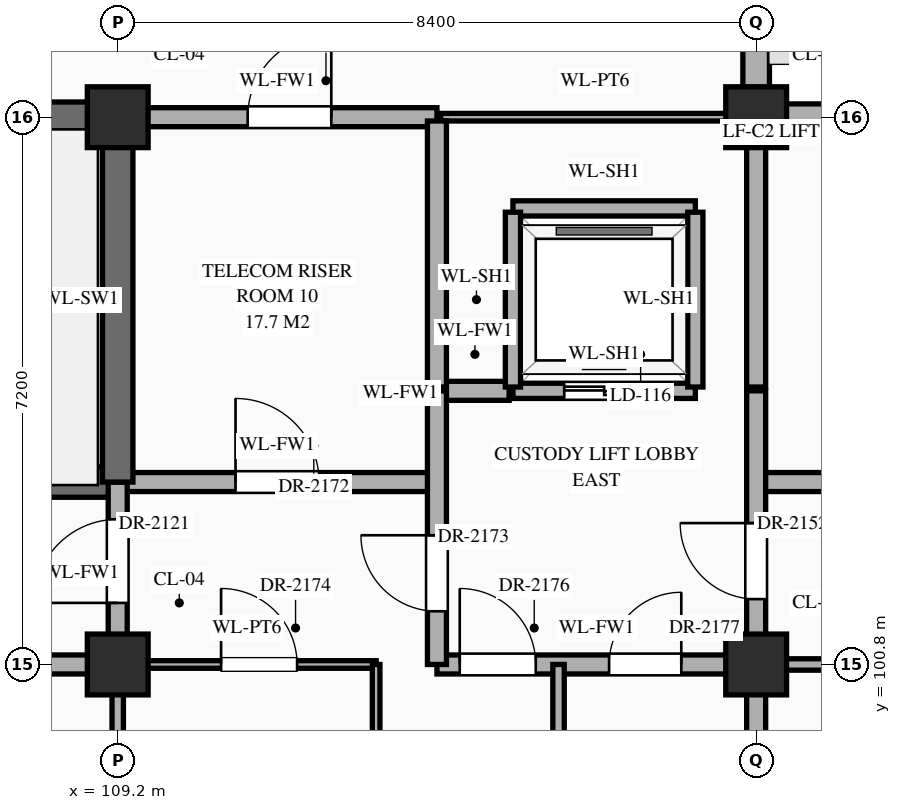
"""IFC4 building model, lengths in metres.
Left out: names, types, materials, properties, quantities, classifications, styles, units other than length and angle.
Written with IfcOpenShell. Run it as: python <this file> out.ifc"""

import sys

from ifc_helpers import new_model, si_unit, direction, frame, frame_2d, origin, origin_2d, place, context, subcontext, project, spatial, rectangle, extrude, element, fill, save


model = new_model("IFC4")
c1 = context("Model", 3, precision=1e-05, world=origin(), true_north=direction((0.0, 1.0)))
c2 = subcontext(c1, "Body", "Model", "MODEL_VIEW")
j1 = project(units=[si_unit("LENGTHUNIT", "METRE"), si_unit("PLANEANGLEUNIT", "RADIAN")], contexts=[c1])
p1 = place(None, origin())
s1 = spatial("IfcSite", under=j1, at=p1, CompositionType="ELEMENT")
p2 = place(p1, origin())
s2 = spatial("IfcBuilding", under=s1, at=p2, CompositionType="ELEMENT")
p3 = place(p2, frame((0.0, 0.0, 26.1)))
s3 = spatial("IfcBuildingStorey", under=s2, at=p3, CompositionType="ELEMENT", Elevation=26.1)
for number, where, z_axis, x_axis in (
    (1, (109.2, 100.8, 0.0), (0.0, 0.0, 1.0), (1.0, 0.0, 0.0)),
    (2, (109.2, 108.0, 0.0), (0.0, 0.0, 1.0), (1.0, 0.0, 0.0)),
    (3, (117.6, 100.8, 0.0), (0.0, 0.0, 1.0), (1.0, 0.0, 0.0)),
    (4, (117.6, 108.0, 0.0), (0.0, 0.0, 1.0), (1.0, 0.0, 0.0)),
):
    element("IfcColumn", number, at=place(p3, frame(where, z_axis=z_axis, x_axis=x_axis)), inside=s3, PredefinedType="COLUMN", context=c2, shape_type="SweptSolid", body=[
        extrude(rectangle(XDim=0.8, YDim=0.8, at=origin_2d()), origin(), (0.0, 0.0, 1.0), 4.5),
    ])
p4 = place(p3, frame((117.6, 108.395, 0.0), z_axis=(0.0, 0.0, 1.0), x_axis=(0.0, 1.0, 0.0)))
e5 = element("IfcWall", 5, at=p4, inside=s3, PredefinedType="STANDARD", context=c2, shape_type="SweptSolid", body=[
    extrude(rectangle(XDim=6.41, YDim=0.35, at=frame_2d((3.205, 0.0))), origin(), (0.0, 0.0, 1.0), 3.59),
])
p5 = place(p4, frame((3.73, 0.0, 0.85)))
e6 = element("IfcOpeningElement", 6, at=p5, cuts=e5, PredefinedType="OPENING", context=c2, shape_type="SweptSolid", body=[
    extrude(rectangle(XDim=1.55, YDim=2.12, at=frame_2d((0.775, 1.06))), frame((0.0, 0.187, 0.0), z_axis=(0.0, -1.0, 0.0), x_axis=(1.0, 0.0, 0.0)), (0.0, 0.0, 1.0), 0.374),
])
p6 = place(p3, frame((117.995, 108.0, 0.0), z_axis=(0.0, 0.0, 1.0), x_axis=(1.0, 0.0, 0.0)))
e7 = element("IfcWall", 7, at=p6, inside=s3, PredefinedType="STANDARD", context=c2, shape_type="SweptSolid", body=[
    extrude(rectangle(XDim=7.61, YDim=0.35, at=frame_2d((3.805, 0.0))), origin(), (0.0, 0.0, 1.0), 3.59),
])
p7 = place(p3, frame((96.6, 100.8, 0.0), z_axis=(0.0, 0.0, 1.0), x_axis=(1.0, 0.0, 0.0)))
e8 = element("IfcWall", 8, at=p7, inside=s3, PredefinedType="STANDARD", context=c2, shape_type="SweptSolid", body=[
    extrude(rectangle(XDim=12.6, YDim=0.25, at=frame_2d((6.3, 0.0))), origin(), (0.0, 0.0, 1.0), 3.39),
])
p8 = place(p7, frame((7.9, 0.0, 0.0)))
e9 = element("IfcOpeningElement", 9, at=p8, cuts=e8, PredefinedType="OPENING", context=c2, shape_type="SweptSolid", body=[
    extrude(rectangle(XDim=1.0, YDim=2.2, at=frame_2d((0.5, 1.1))), frame((0.0, 0.137, 0.0), z_axis=(0.0, -1.0, 0.0), x_axis=(1.0, 0.0, 0.0)), (0.0, 0.0, 1.0), 0.274),
])
p9 = place(p3, frame((109.2, 100.8, 0.0), z_axis=(0.0, 0.0, 1.0), x_axis=(1.0, 0.0, 0.0)))
e10 = element("IfcWall", 10, at=p9, inside=s3, PredefinedType="STANDARD", context=c2, shape_type="SweptSolid", body=[
    extrude(rectangle(XDim=3.4, YDim=0.1, at=frame_2d((1.7, 0.0))), origin(), (0.0, 0.0, 1.0), 3.39),
])
p10 = place(p9, frame((1.36, 0.0, 0.0)))
e11 = element("IfcOpeningElement", 11, at=p10, cuts=e10, PredefinedType="OPENING", context=c2, shape_type="SweptSolid", body=[
    extrude(rectangle(XDim=1.0, YDim=2.25, at=frame_2d((0.5, 1.125))), frame((0.0, 0.062, 0.0), z_axis=(0.0, -1.0, 0.0), x_axis=(1.0, 0.0, 0.0)), (0.0, 0.0, 1.0), 0.124),
])
p11 = place(p3, frame((113.4, 100.8, 0.0), z_axis=(0.0, 0.0, 1.0), x_axis=(1.0, 0.0, 0.0)))
e12 = element("IfcWall", 12, at=p11, inside=s3, PredefinedType="STANDARD", context=c2, shape_type="SweptSolid", body=[
    extrude(rectangle(XDim=4.2, YDim=0.25, at=frame_2d((2.1, 0.0))), origin(), (0.0, 0.0, 1.0), 3.39),
])
p12 = place(p11, frame((0.3, 0.0, 0.0)))
e13 = element("IfcOpeningElement", 13, at=p12, cuts=e12, PredefinedType="OPENING", context=c2, shape_type="SweptSolid", body=[
    extrude(rectangle(XDim=1.0, YDim=2.2, at=frame_2d((0.5, 1.1))), frame((0.0, 0.137, 0.0), z_axis=(0.0, -1.0, 0.0), x_axis=(1.0, 0.0, 0.0)), (0.0, 0.0, 1.0), 0.274),
])
p13 = place(p11, frame((2.265, 0.0, 0.0)))
e14 = element("IfcOpeningElement", 14, at=p13, cuts=e12, PredefinedType="OPENING", context=c2, shape_type="SweptSolid", body=[
    extrude(rectangle(XDim=0.95, YDim=2.15, at=frame_2d((0.475, 1.075))), frame((0.0, 0.137, 0.0), z_axis=(0.0, -1.0, 0.0), x_axis=(1.0, 0.0, 0.0)), (0.0, 0.0, 1.0), 0.274),
])
p14 = place(p3, frame((117.6, 100.8, 0.0), z_axis=(0.0, 0.0, 1.0), x_axis=(1.0, 0.0, 0.0)))
e15 = element("IfcWall", 15, at=p14, inside=s3, PredefinedType="STANDARD", context=c2, shape_type="SweptSolid", body=[
    extrude(rectangle(XDim=4.2, YDim=0.15, at=frame_2d((2.1, 0.0))), origin(), (0.0, 0.0, 1.0), 3.39),
])
p15 = place(p14, frame((1.81, 0.0, 0.0)))
e16 = element("IfcOpeningElement", 16, at=p15, cuts=e15, PredefinedType="OPENING", context=c2, shape_type="SweptSolid", body=[
    extrude(rectangle(XDim=0.9, YDim=2.15, at=frame_2d((0.45, 1.075))), frame((0.0, 0.087, 0.0), z_axis=(0.0, -1.0, 0.0), x_axis=(1.0, 0.0, 0.0)), (0.0, 0.0, 1.0), 0.174),
])
p16 = place(p3, frame((100.8, 103.2, 0.0), z_axis=(0.0, 0.0, 1.0), x_axis=(1.0, 0.0, 0.0)))
e17 = element("IfcWall", 17, at=p16, inside=s3, PredefinedType="SHEAR", context=c2, shape_type="SweptSolid", body=[
    extrude(rectangle(XDim=8.4, YDim=0.4, at=frame_2d((4.2, 0.0))), origin(), (0.0, 0.0, 1.0), 4.24),
])
p17 = place(p16, frame((0.65, 0.0, 0.0)))
e18 = element("IfcOpeningElement", 18, at=p17, cuts=e17, PredefinedType="OPENING", context=c2, shape_type="SweptSolid", body=[
    extrude(rectangle(XDim=1.1, YDim=2.2, at=frame_2d((0.55, 1.1))), frame((0.0, 0.212, 0.0), z_axis=(0.0, -1.0, 0.0), x_axis=(1.0, 0.0, 0.0)), (0.0, 0.0, 1.0), 0.424),
])
p18 = place(p3, frame((109.2, 103.2, 0.0), z_axis=(0.0, 0.0, 1.0), x_axis=(1.0, 0.0, 0.0)))
e19 = element("IfcWall", 19, at=p18, inside=s3, PredefinedType="STANDARD", context=c2, shape_type="SweptSolid", body=[
    extrude(rectangle(XDim=4.2, YDim=0.25, at=frame_2d((2.1, 0.0))), origin(), (0.0, 0.0, 1.0), 4.24),
])
p19 = place(p18, frame((1.55, 0.0, 0.0)))
e20 = element("IfcOpeningElement", 20, at=p19, cuts=e19, PredefinedType="OPENING", context=c2, shape_type="SweptSolid", body=[
    extrude(rectangle(XDim=1.1, YDim=2.2, at=frame_2d((0.55, 1.1))), frame((0.0, 0.137, 0.0), z_axis=(0.0, -1.0, 0.0), x_axis=(1.0, 0.0, 0.0)), (0.0, 0.0, 1.0), 0.274),
])
p20 = place(p3, frame((117.6, 103.2, 0.0), z_axis=(0.0, 0.0, 1.0), x_axis=(1.0, 0.0, 0.0)))
e21 = element("IfcWall", 21, at=p20, inside=s3, PredefinedType="STANDARD", context=c2, shape_type="SweptSolid", body=[
    extrude(rectangle(XDim=4.2, YDim=0.25, at=frame_2d((2.1, 0.0))), origin(), (0.0, 0.0, 1.0), 4.24),
])
p21 = place(p20, frame((1.625, 0.0, 0.0)))
e22 = element("IfcOpeningElement", 22, at=p21, cuts=e21, PredefinedType="OPENING", context=c2, shape_type="SweptSolid", body=[
    extrude(rectangle(XDim=0.95, YDim=2.15, at=frame_2d((0.475, 1.075))), frame((0.0, 0.137, 0.0), z_axis=(0.0, -1.0, 0.0), x_axis=(1.0, 0.0, 0.0)), (0.0, 0.0, 1.0), 0.274),
])
p22 = place(p3, frame((113.45, 104.4, 0.0), z_axis=(0.0, 0.0, 1.0), x_axis=(1.0, 0.0, 0.0)))
e23 = element("IfcWall", 23, at=p22, inside=s3, PredefinedType="STANDARD", context=c2, shape_type="SweptSolid", body=[
    extrude(rectangle(XDim=0.9, YDim=0.25, at=frame_2d((0.45, 0.0))), origin(), (0.0, 0.0, 1.0), 4.24),
])
p23 = place(p3, frame((114.4, 104.4, 0.0), z_axis=(0.0, 0.0, 1.0), x_axis=(1.0, 0.0, 0.0)))
e24 = element("IfcWall", 24, at=p23, inside=s3, PredefinedType="STANDARD", context=c2, shape_type="SweptSolid", body=[
    extrude(rectangle(XDim=2.4, YDim=0.2, at=frame_2d((1.2, 0.0))), origin(), (0.0, 0.0, 1.0), 4.24),
])
p24 = place(p23, frame((0.675, 0.0, 0.0)))
e25 = element("IfcOpeningElement", 25, at=p24, cuts=e24, PredefinedType="OPENING", context=c2, shape_type="SweptSolid", body=[
    extrude(rectangle(XDim=1.05, YDim=2.15, at=frame_2d((0.525, 1.075))), frame((0.0, 0.112, 0.0), z_axis=(0.0, -1.0, 0.0), x_axis=(1.0, 0.0, 0.0)), (0.0, 0.0, 1.0), 0.224),
])
p25 = place(p3, frame((114.4, 106.8, 0.0), z_axis=(0.0, 0.0, 1.0), x_axis=(1.0, 0.0, 0.0)))
e26 = element("IfcWall", 26, at=p25, inside=s3, PredefinedType="STANDARD", context=c2, shape_type="SweptSolid", body=[
    extrude(rectangle(XDim=2.4, YDim=0.2, at=frame_2d((1.2, 0.0))), origin(), (0.0, 0.0, 1.0), 4.24),
])
p26 = place(p3, frame((100.8, 108.0, 0.0), z_axis=(0.0, 0.0, 1.0), x_axis=(1.0, 0.0, 0.0)))
e27 = element("IfcWall", 27, at=p26, inside=s3, PredefinedType="SHEAR", context=c2, shape_type="SweptSolid", body=[
    extrude(rectangle(XDim=8.4, YDim=0.4, at=frame_2d((4.2, 0.0))), origin(), (0.0, 0.0, 1.0), 4.24),
])
p27 = place(p3, frame((109.2, 108.0, 0.0), z_axis=(0.0, 0.0, 1.0), x_axis=(1.0, 0.0, 0.0)))
e28 = element("IfcWall", 28, at=p27, inside=s3, PredefinedType="STANDARD", context=c2, shape_type="SweptSolid", body=[
    extrude(rectangle(XDim=4.2, YDim=0.25, at=frame_2d((2.1, 0.0))), origin(), (0.0, 0.0, 1.0), 3.39),
])
p28 = place(p27, frame((1.71, 0.0, 0.0)))
e29 = element("IfcOpeningElement", 29, at=p28, cuts=e28, PredefinedType="OPENING", context=c2, shape_type="SweptSolid", body=[
    extrude(rectangle(XDim=1.1, YDim=2.2, at=frame_2d((0.55, 1.1))), frame((0.0, 0.137, 0.0), z_axis=(0.0, -1.0, 0.0), x_axis=(1.0, 0.0, 0.0)), (0.0, 0.0, 1.0), 0.274),
])
p29 = place(p3, frame((113.45, 108.0, 0.0), z_axis=(0.0, 0.0, 1.0), x_axis=(1.0, 0.0, 0.0)))
e30 = element("IfcWall", 30, at=p29, inside=s3, PredefinedType="STANDARD", context=c2, shape_type="SweptSolid", body=[
    extrude(rectangle(XDim=4.06, YDim=0.1, at=frame_2d((2.03, 0.0))), origin(), (0.0, 0.0, 1.0), 3.39),
])
p30 = place(p3, frame((109.2, 96.0, 0.0), z_axis=(0.0, 0.0, 1.0), x_axis=(0.0, 1.0, 0.0)))
e31 = element("IfcWall", 31, at=p30, inside=s3, PredefinedType="STANDARD", context=c2, shape_type="SweptSolid", body=[
    extrude(rectangle(XDim=4.8, YDim=0.15, at=frame_2d((2.4, 0.0))), origin(), (0.0, 0.0, 1.0), 3.49),
])
p31 = place(p3, frame((109.2, 100.8, 0.0), z_axis=(0.0, 0.0, 1.0), x_axis=(0.0, 1.0, 0.0)))
e32 = element("IfcWall", 32, at=p31, inside=s3, PredefinedType="STANDARD", context=c2, shape_type="SweptSolid", body=[
    extrude(rectangle(XDim=2.4, YDim=0.25, at=frame_2d((1.2, 0.0))), origin(), (0.0, 0.0, 1.0), 3.49),
])
p32 = place(p31, frame((0.81, 0.0, 0.0)))
e33 = element("IfcOpeningElement", 33, at=p32, cuts=e32, PredefinedType="OPENING", context=c2, shape_type="SweptSolid", body=[
    extrude(rectangle(XDim=1.1, YDim=2.2, at=frame_2d((0.55, 1.1))), frame((0.0, 0.137, 0.0), z_axis=(0.0, -1.0, 0.0), x_axis=(1.0, 0.0, 0.0)), (0.0, 0.0, 1.0), 0.274),
])
p33 = place(p3, frame((109.2, 103.2, 0.0), z_axis=(0.0, 0.0, 1.0), x_axis=(0.0, 1.0, 0.0)))
e34 = element("IfcWall", 34, at=p33, inside=s3, PredefinedType="SHEAR", context=c2, shape_type="SweptSolid", body=[
    extrude(rectangle(XDim=4.8, YDim=0.4, at=frame_2d((2.4, 0.0))), origin(), (0.0, 0.0, 1.0), 4.24),
])
p34 = place(p3, frame((112.6, 96.0, 0.0), z_axis=(0.0, 0.0, 1.0), x_axis=(0.0, 1.0, 0.0)))
e35 = element("IfcWall", 35, at=p34, inside=s3, PredefinedType="STANDARD", context=c2, shape_type="SweptSolid", body=[
    extrude(rectangle(XDim=4.8, YDim=0.1, at=frame_2d((2.4, 0.0))), origin(), (0.0, 0.0, 1.0), 4.24),
])
p35 = place(p34, frame((1.84, 0.0, 0.0)))
e36 = element("IfcOpeningElement", 36, at=p35, cuts=e35, PredefinedType="OPENING", context=c2, shape_type="SweptSolid", body=[
    extrude(rectangle(XDim=1.12, YDim=2.25, at=frame_2d((0.56, 1.125))), frame((0.0, 0.062, 0.0), z_axis=(0.0, -1.0, 0.0), x_axis=(1.0, 0.0, 0.0)), (0.0, 0.0, 1.0), 0.124),
])
p36 = place(p3, frame((113.4, 100.8, 0.0), z_axis=(0.0, 0.0, 1.0), x_axis=(0.0, 1.0, 0.0)))
e37 = element("IfcWall", 37, at=p36, inside=s3, PredefinedType="STANDARD", context=c2, shape_type="SweptSolid", body=[
    extrude(rectangle(XDim=3.6, YDim=0.25, at=frame_2d((1.8, 0.0))), origin(), (0.0, 0.0, 1.0), 3.84),
])
p37 = place(p36, frame((0.7, 0.0, 0.0)))
e38 = element("IfcOpeningElement", 38, at=p37, cuts=e37, PredefinedType="OPENING", context=c2, shape_type="SweptSolid", body=[
    extrude(rectangle(XDim=1.0, YDim=2.2, at=frame_2d((0.5, 1.1))), frame((0.0, 0.137, 0.0), z_axis=(0.0, -1.0, 0.0), x_axis=(1.0, 0.0, 0.0)), (0.0, 0.0, 1.0), 0.274),
])
p38 = place(p3, frame((113.4, 104.45, 0.0), z_axis=(0.0, 0.0, 1.0), x_axis=(0.0, 1.0, 0.0)))
e39 = element("IfcWall", 39, at=p38, inside=s3, PredefinedType="STANDARD", context=c2, shape_type="SweptSolid", body=[
    extrude(rectangle(XDim=3.5, YDim=0.25, at=frame_2d((1.75, 0.0))), origin(), (0.0, 0.0, 1.0), 3.84),
])
p39 = place(p3, frame((114.4, 104.45, 0.0), z_axis=(0.0, 0.0, 1.0), x_axis=(0.0, 1.0, 0.0)))
e40 = element("IfcWall", 40, at=p39, inside=s3, PredefinedType="STANDARD", context=c2, shape_type="SweptSolid", body=[
    extrude(rectangle(XDim=2.3, YDim=0.2, at=frame_2d((1.15, 0.0))), origin(), (0.0, 0.0, 1.0), 4.24),
])
p40 = place(p3, frame((115.0, 96.0, 0.0), z_axis=(0.0, 0.0, 1.0), x_axis=(0.0, 1.0, 0.0)))
e41 = element("IfcWall", 41, at=p40, inside=s3, PredefinedType="STANDARD", context=c2, shape_type="SweptSolid", body=[
    extrude(rectangle(XDim=4.8, YDim=0.15, at=frame_2d((2.4, 0.0))), origin(), (0.0, 0.0, 1.0), 4.24),
])
p41 = place(p40, frame((1.82, 0.0, 0.0)))
e42 = element("IfcOpeningElement", 42, at=p41, cuts=e41, PredefinedType="OPENING", context=c2, shape_type="SweptSolid", body=[
    extrude(rectangle(XDim=1.16, YDim=2.3, at=frame_2d((0.58, 1.15))), frame((0.0, 0.087, 0.0), z_axis=(0.0, -1.0, 0.0), x_axis=(1.0, 0.0, 0.0)), (0.0, 0.0, 1.0), 0.174),
])
p42 = place(p3, frame((116.8, 104.45, 0.0), z_axis=(0.0, 0.0, 1.0), x_axis=(0.0, 1.0, 0.0)))
e43 = element("IfcWall", 43, at=p42, inside=s3, PredefinedType="STANDARD", context=c2, shape_type="SweptSolid", body=[
    extrude(rectangle(XDim=2.3, YDim=0.2, at=frame_2d((1.15, 0.0))), origin(), (0.0, 0.0, 1.0), 4.24),
])
p43 = place(p3, frame((117.6, 91.2, 0.0), z_axis=(0.0, 0.0, 1.0), x_axis=(0.0, 1.0, 0.0)))
e44 = element("IfcWall", 44, at=p43, inside=s3, PredefinedType="STANDARD", context=c2, shape_type="SweptSolid", body=[
    extrude(rectangle(XDim=13.2, YDim=0.25, at=frame_2d((6.6, 0.0))), origin(), (0.0, 0.0, 1.0), 3.49),
])
p44 = place(p43, frame((0.49, 0.0, 0.0)))
e45 = element("IfcOpeningElement", 45, at=p44, cuts=e44, PredefinedType="OPENING", context=c2, shape_type="SweptSolid", body=[
    extrude(rectangle(XDim=1.1, YDim=2.2, at=frame_2d((0.55, 1.1))), frame((0.0, 0.137, 0.0), z_axis=(0.0, -1.0, 0.0), x_axis=(1.0, 0.0, 0.0)), (0.0, 0.0, 1.0), 0.274),
])
p45 = place(p43, frame((10.46, 0.0, 0.0)))
e46 = element("IfcOpeningElement", 46, at=p45, cuts=e44, PredefinedType="OPENING", context=c2, shape_type="SweptSolid", body=[
    extrude(rectangle(XDim=1.0, YDim=2.2, at=frame_2d((0.5, 1.1))), frame((0.0, 0.137, 0.0), z_axis=(0.0, -1.0, 0.0), x_axis=(1.0, 0.0, 0.0)), (0.0, 0.0, 1.0), 0.274),
])
p46 = place(p43, frame((3.26, 0.0, 0.0)))
e47 = element("IfcOpeningElement", 47, at=p46, cuts=e44, PredefinedType="OPENING", context=c2, shape_type="SweptSolid", body=[
    extrude(rectangle(XDim=1.0, YDim=2.2, at=frame_2d((0.5, 1.1))), frame((0.0, 0.137, 0.0), z_axis=(0.0, -1.0, 0.0), x_axis=(1.0, 0.0, 0.0)), (0.0, 0.0, 1.0), 0.274),
])
p47 = place(p3, frame((117.6, 104.45, 0.0), z_axis=(0.0, 0.0, 1.0), x_axis=(0.0, 1.0, 0.0)))
e48 = element("IfcWall", 48, at=p47, inside=s3, PredefinedType="STANDARD", context=c2, shape_type="SweptSolid", body=[
    extrude(rectangle(XDim=3.46, YDim=0.25, at=frame_2d((1.73, 0.0))), origin(), (0.0, 0.0, 1.0), 3.49),
])
p48 = place(p24, origin())
e49 = element("IfcDoor", 49, at=p48, inside=s3, OperationType="DOUBLE_DOOR_SLIDING", PredefinedType="DOOR", context=c2, shape_type="SweptSolid", body=[
    extrude(rectangle(XDim=1.05, YDim=2.15, at=frame_2d((0.525, 1.075))), frame((0.0, 0.025, 0.0), z_axis=(0.0, -1.0, 0.0), x_axis=(1.0, 0.0, 0.0)), (0.0, 0.0, 1.0), 0.05),
])
fill(e25, e49)
p49 = place(p32, origin())
e50 = element("IfcDoor", 50, at=p49, inside=s3, OperationType="SINGLE_SWING_LEFT", PredefinedType="DOOR", context=c2, shape_type="SweptSolid", body=[
    extrude(rectangle(XDim=1.1, YDim=2.2, at=frame_2d((0.55, 1.1))), frame((0.0, 0.025, 0.0), z_axis=(0.0, -1.0, 0.0), x_axis=(1.0, 0.0, 0.0)), (0.0, 0.0, 1.0), 0.05),
])
fill(e33, e50)
p50 = place(p45, origin())
e51 = element("IfcDoor", 51, at=p50, inside=s3, OperationType="SINGLE_SWING_RIGHT", PredefinedType="DOOR", context=c2, shape_type="SweptSolid", body=[
    extrude(rectangle(XDim=1.0, YDim=2.2, at=frame_2d((0.5, 1.1))), frame((0.0, 0.025, 0.0), z_axis=(0.0, -1.0, 0.0), x_axis=(1.0, 0.0, 0.0)), (0.0, 0.0, 1.0), 0.05),
])
fill(e46, e51)
p51 = place(p19, origin())
e52 = element("IfcDoor", 52, at=p51, inside=s3, OperationType="SINGLE_SWING_LEFT", PredefinedType="DOOR", context=c2, shape_type="SweptSolid", body=[
    extrude(rectangle(XDim=1.1, YDim=2.2, at=frame_2d((0.55, 1.1))), frame((0.0, 0.025, 0.0), z_axis=(0.0, -1.0, 0.0), x_axis=(1.0, 0.0, 0.0)), (0.0, 0.0, 1.0), 0.05),
])
fill(e20, e52)
p52 = place(p37, origin())
e53 = element("IfcDoor", 53, at=p52, inside=s3, OperationType="SINGLE_SWING_RIGHT", PredefinedType="DOOR", context=c2, shape_type="SweptSolid", body=[
    extrude(rectangle(XDim=1.0, YDim=2.2, at=frame_2d((0.5, 1.1))), frame((0.0, 0.025, 0.0), z_axis=(0.0, -1.0, 0.0), x_axis=(1.0, 0.0, 0.0)), (0.0, 0.0, 1.0), 0.05),
])
fill(e38, e53)
p53 = place(p10, origin())
e54 = element("IfcDoor", 54, at=p53, inside=s3, OperationType="SINGLE_SWING_LEFT", PredefinedType="DOOR", context=c2, shape_type="SweptSolid", body=[
    extrude(rectangle(XDim=1.0, YDim=2.25, at=frame_2d((0.5, 1.125))), frame((0.0, 0.025, 0.0), z_axis=(0.0, -1.0, 0.0), x_axis=(1.0, 0.0, 0.0)), (0.0, 0.0, 1.0), 0.05),
])
fill(e11, e54)
p54 = place(p28, origin())
e55 = element("IfcDoor", 55, at=p54, inside=s3, OperationType="SINGLE_SWING_RIGHT", PredefinedType="DOOR", context=c2, shape_type="SweptSolid", body=[
    extrude(rectangle(XDim=1.1, YDim=2.2, at=frame_2d((0.55, 1.1))), frame((0.0, 0.025, 0.0), z_axis=(0.0, -1.0, 0.0), x_axis=(1.0, 0.0, 0.0)), (0.0, 0.0, 1.0), 0.05),
])
fill(e29, e55)
p55 = place(p12, origin())
e56 = element("IfcDoor", 56, at=p55, inside=s3, OperationType="SINGLE_SWING_LEFT", PredefinedType="DOOR", context=c2, shape_type="SweptSolid", body=[
    extrude(rectangle(XDim=1.0, YDim=2.2, at=frame_2d((0.5, 1.1))), frame((0.0, 0.025, 0.0), z_axis=(0.0, -1.0, 0.0), x_axis=(1.0, 0.0, 0.0)), (0.0, 0.0, 1.0), 0.05),
])
fill(e13, e56)
p56 = place(p13, origin())
e57 = element("IfcDoor", 57, at=p56, inside=s3, OperationType="SINGLE_SWING_RIGHT", PredefinedType="DOOR", context=c2, shape_type="SweptSolid", body=[
    extrude(rectangle(XDim=0.95, YDim=2.15, at=frame_2d((0.475, 1.075))), frame((0.0, 0.025, 0.0), z_axis=(0.0, -1.0, 0.0), x_axis=(1.0, 0.0, 0.0)), (0.0, 0.0, 1.0), 0.05),
])
fill(e14, e57)
save(model, sys.argv[1])
